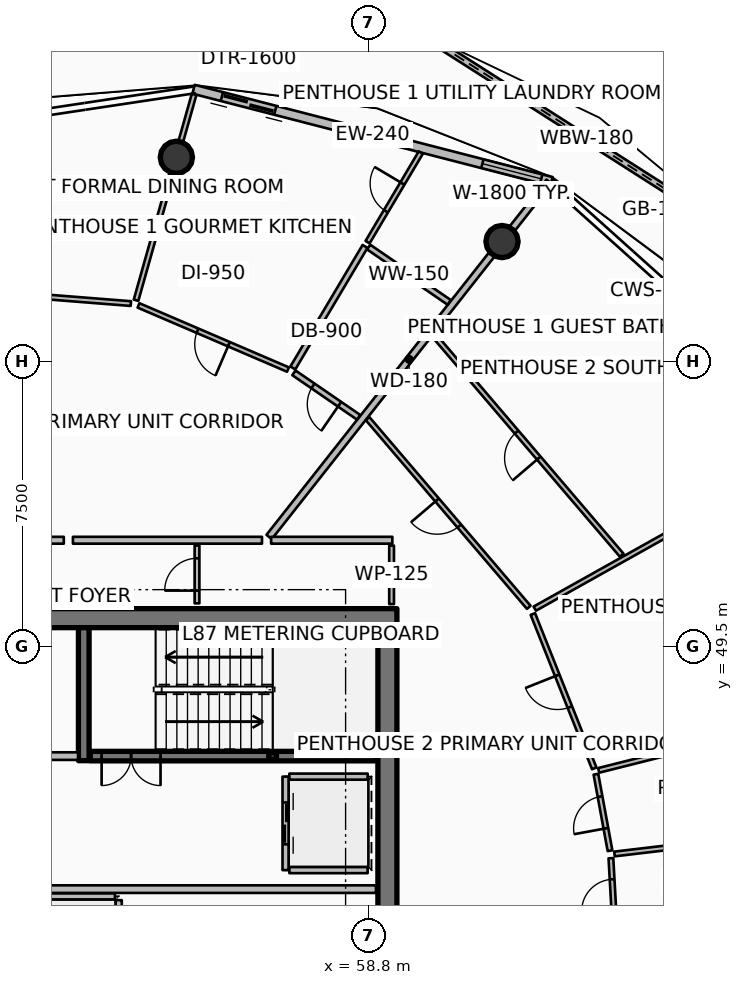
"""IFC4 building model, lengths in metres.
Left out: names, types, materials, properties, quantities, classifications, styles, units other than length and angle.
Written with IfcOpenShell. Run it as: python <this file> out.ifc"""

import sys

from ifc_helpers import new_model, si_unit, direction, frame, frame_2d, origin, origin_2d, place, context, subcontext, project, spatial, polyline, rectangle, hollow_rectangle, circle, outline, extrude, element, fill, save


model = new_model("IFC4")
c1 = context("Model", 3, precision=1e-05, world=origin(), true_north=direction((0.0, 1.0)))
c2 = subcontext(c1, "Body", "Model", "MODEL_VIEW")
j1 = project(units=[si_unit("LENGTHUNIT", "METRE"), si_unit("PLANEANGLEUNIT", "RADIAN")], contexts=[c1])
p1 = place(None, origin())
s1 = spatial("IfcSite", under=j1, at=p1, CompositionType="ELEMENT")
p2 = place(p1, origin())
s2 = spatial("IfcBuilding", under=s1, at=p2, CompositionType="ELEMENT")
p3 = place(p2, frame((0.0, 0.0, 347.3)))
s3 = spatial("IfcBuildingStorey", under=s2, at=p3, CompositionType="ELEMENT", Elevation=347.3)
p4 = place(p3, frame((49.95, 50.25, 0.0), z_axis=(0.0, 0.0, 1.0), x_axis=(1.0, 0.0, 0.0)))
e1 = element("IfcWall", 1, at=p4, inside=s3, PredefinedType="SHEAR", context=c2, shape_type="SweptSolid", body=[
    extrude(rectangle(XDim=9.6, YDim=0.5, at=frame_2d((4.8, 0.0))), origin(), (0.0, 0.0, 1.0), 4.2),
])
p5 = place(p3, frame((59.3, 34.0, 0.0), z_axis=(0.0, 0.0, 1.0), x_axis=(0.0, 1.0, 0.0)))
e2 = element("IfcWall", 2, at=p5, inside=s3, PredefinedType="SHEAR", context=c2, shape_type="SweptSolid", body=[
    extrude(rectangle(XDim=16.0, YDim=0.5, at=frame_2d((8.0, 0.0))), origin(), (0.0, 0.0, 1.0), 4.2),
])
p6 = place(p3, frame((51.31, 46.5, 0.0), z_axis=(0.0, 0.0, 1.0), x_axis=(0.0, 1.0, 0.0)))
e3 = element("IfcWall", 3, at=p6, inside=s3, PredefinedType="SHEAR", context=c2, shape_type="SweptSolid", body=[
    extrude(rectangle(XDim=3.5, YDim=0.28, at=frame_2d((1.75, 0.0))), origin(), (0.0, 0.0, 1.0), 4.2),
])
p7 = place(p3, frame((56.28, 46.62, 0.0), z_axis=(0.0, 0.0, 1.0), x_axis=(1.0, 0.0, 0.0)))
e4 = element("IfcColumn", 4, at=p7, inside=s3, PredefinedType="COLUMN", context=c2, shape_type="SweptSolid", body=[
    extrude(hollow_rectangle(XDim=0.2, YDim=0.2, WallThickness=0.01, InnerFilletRadius=0.01, OuterFilletRadius=0.02, at=origin_2d()), origin(), (0.0, 0.0, 1.0), 1.895),
])
p8 = place(p3, frame((62.316, 60.159, 0.0), z_axis=(-0.160640140705, -0.203700881396, 0.965764306709), x_axis=(0.785213254806, -0.619225439139, 0.0)))
e5 = element("IfcColumn", 5, at=p8, inside=s3, PredefinedType="COLUMN", context=c2, shape_type="SweptSolid", body=[
    extrude(circle(Radius=0.425, at=origin_2d()), origin(), (0.0, 0.0, 1.0), 3.935),
])
p9 = place(p3, frame((53.747, 62.376, 0.0), z_axis=(-0.064758926889, -0.229838041096, 0.971071962448), x_axis=(0.96252315306, -0.271199520325, 0.0)))
e6 = element("IfcColumn", 6, at=p9, inside=s3, PredefinedType="COLUMN", context=c2, shape_type="SweptSolid", body=[
    extrude(circle(Radius=0.425, at=origin_2d()), origin(), (0.0, 0.0, 1.0), 3.913),
])
p10 = place(p3, frame((68.907, 60.078, 0.0), z_axis=(0.0, 0.0, 1.0), x_axis=(-0.842921526724, 0.538036522725, 0.0)))
e7 = element("IfcWall", 7, at=p10, inside=s3, PredefinedType="PARAPET", context=c2, shape_type="SweptSolid", body=[
    extrude(outline(polyline([(0.0, 0.0), (10.35, 0.0), (10.35, 1.632), (5.175, 1.418), (0.0, 1.233), (0.0, 0.0)])), frame((0.0, 0.09, 0.0), z_axis=(0.0, -1.0, 0.0), x_axis=(1.0, 0.0, 0.0)), (0.0, 0.0, 1.0), 0.18),
])
p11 = place(p3, frame((63.62, 61.74, 0.0), z_axis=(0.0, 0.0, 1.0), x_axis=(-0.968389076094, 0.249444577616, 0.0)))
e8 = element("IfcWall", 8, at=p11, inside=s3, PredefinedType="SOLIDWALL", context=c2, shape_type="SweptSolid", body=[
    extrude(rectangle(XDim=9.728, YDim=0.24, at=frame_2d((4.864, 0.0))), origin(), (0.0, 0.0, 1.0), 2.75),
])
p12 = place(p11, frame((7.508, 0.0, 0.0)))
e9 = element("IfcOpeningElement", 9, at=p12, cuts=e8, PredefinedType="OPENING", context=c2, shape_type="SweptSolid", body=[
    extrude(rectangle(XDim=1.45, YDim=2.15, at=frame_2d((0.725, 1.075))), frame((0.0, 0.13, 0.0), z_axis=(0.0, -1.0, 0.0), x_axis=(1.0, 0.0, 0.0)), (0.0, 0.0, 1.0), 0.26),
])
p13 = place(p11, frame((0.28, 0.0, 0.65)))
e10 = element("IfcOpeningElement", 10, at=p13, cuts=e8, PredefinedType="OPENING", context=c2, shape_type="SweptSolid", body=[
    extrude(rectangle(XDim=1.6, YDim=1.5, at=frame_2d((0.8, 0.75))), frame((0.0, 0.13, 0.0), z_axis=(0.0, -1.0, 0.0), x_axis=(1.0, 0.0, 0.0)), (0.0, 0.0, 1.0), 0.26),
])
p14 = place(p3, frame((51.48, 46.62, 0.0), z_axis=(0.0, 0.0, 1.0), x_axis=(1.0, 0.0, 0.0)))
e11 = element("IfcWall", 11, at=p14, inside=s3, PredefinedType="SOLIDWALL", context=c2, shape_type="SweptSolid", body=[
    extrude(rectangle(XDim=7.54, YDim=0.25, at=frame_2d((3.77, 0.0))), origin(), (0.0, 0.0, 1.0), 3.8),
])
p15 = place(p14, frame((0.3, 0.0, 0.0)))
e12 = element("IfcOpeningElement", 12, at=p15, cuts=e11, PredefinedType="OPENING", context=c2, shape_type="SweptSolid", body=[
    extrude(rectangle(XDim=1.55, YDim=2.15, at=frame_2d((0.775, 1.075))), frame((0.0, 0.135, 0.0), z_axis=(0.0, -1.0, 0.0), x_axis=(1.0, 0.0, 0.0)), (0.0, 0.0, 1.0), 0.27),
])
p16 = place(p3, frame((56.62, 46.08, 0.0), z_axis=(0.0, 0.0, 1.0), x_axis=(0.0, -1.0, 0.0)))
e13 = element("IfcWall", 13, at=p16, inside=s3, PredefinedType="PARTITIONING", context=c2, shape_type="SweptSolid", body=[
    extrude(rectangle(XDim=2.46, YDim=0.16, at=frame_2d((1.23, 0.0))), origin(), (0.0, 0.0, 1.0), 3.8),
])
p17 = place(p16, frame((0.68, 0.0, 0.0)))
e14 = element("IfcOpeningElement", 14, at=p17, cuts=e13, PredefinedType="OPENING", context=c2, shape_type="SweptSolid", body=[
    extrude(rectangle(XDim=1.1, YDim=2.1, at=frame_2d((0.55, 1.05))), frame((0.0, 0.09, 0.0), z_axis=(0.0, -1.0, 0.0), x_axis=(1.0, 0.0, 0.0)), (0.0, 0.0, 1.0), 0.18),
])
for number, where, z_axis, x_axis in (
    (15, (56.72, 46.08, 0.0), (0.0, 0.0, 1.0), (1.0, 0.0, 0.0)),
    (16, (56.72, 43.62, 0.0), (0.0, 0.0, 1.0), (1.0, 0.0, 0.0)),
):
    element("IfcWall", number, at=place(p3, frame(where, z_axis=z_axis, x_axis=x_axis)), inside=s3, PredefinedType="PARTITIONING", context=c2, shape_type="SweptSolid", body=[
        extrude(rectangle(XDim=2.06, YDim=0.16, at=frame_2d((1.03, 0.0))), origin(), (0.0, 0.0, 1.0), 3.8),
    ])
p18 = place(p3, frame((52.23, 40.67, 0.0), z_axis=(0.0, 0.0, 1.0), x_axis=(0.0, 1.0, 0.0)))
e17 = element("IfcWall", 17, at=p18, inside=s3, PredefinedType="PARTITIONING", context=c2, shape_type="SweptSolid", body=[
    extrude(rectangle(XDim=2.16, YDim=0.16, at=frame_2d((1.08, 0.0))), origin(), (0.0, 0.0, 1.0), 3.8),
])
p19 = place(p3, frame((50.17, 42.93, 0.0), z_axis=(0.0, 0.0, 1.0), x_axis=(1.0, 0.0, 0.0)))
e18 = element("IfcWall", 18, at=p19, inside=s3, PredefinedType="PARTITIONING", context=c2, shape_type="SweptSolid", body=[
    extrude(rectangle(XDim=1.96, YDim=0.16, at=frame_2d((0.98, 0.0))), origin(), (0.0, 0.0, 1.0), 3.8),
])
p20 = place(p3, frame((50.12, 43.12, 0.0), z_axis=(0.0, 0.0, 1.0), x_axis=(1.0, 0.0, 0.0)))
e19 = element("IfcWall", 19, at=p20, inside=s3, PredefinedType="PARTITIONING", context=c2, shape_type="SweptSolid", body=[
    extrude(rectangle(XDim=8.88, YDim=0.2, at=frame_2d((4.44, 0.0))), origin(), (0.0, 0.0, 1.0), 3.8),
])
p21 = place(p3, frame((50.14, 46.62, 0.0), z_axis=(0.0, 0.0, 1.0), x_axis=(1.0, 0.0, 0.0)))
e20 = element("IfcWall", 20, at=p21, inside=s3, PredefinedType="PARTITIONING", context=c2, shape_type="SweptSolid", body=[
    extrude(rectangle(XDim=1.02, YDim=0.2, at=frame_2d((0.51, 0.0))), origin(), (0.0, 0.0, 1.0), 3.8),
])
p22 = place(p3, frame((59.41, 50.62, 0.0), z_axis=(0.0, 0.0, 1.0), x_axis=(0.0, 1.0, 0.0)))
e21 = element("IfcWall", 21, at=p22, inside=s3, PredefinedType="PARTITIONING", context=c2, shape_type="SweptSolid", body=[
    extrude(rectangle(XDim=1.54, YDim=0.125, at=frame_2d((0.77, 0.0))), origin(), (0.0, 0.0, 1.0), 3.24),
])
p23 = place(p3, frame((54.29, 50.64, 0.0), z_axis=(0.0, 0.0, 1.0), x_axis=(0.0, 1.0, 0.0)))
e22 = element("IfcWall", 22, at=p23, inside=s3, PredefinedType="PARTITIONING", context=c2, shape_type="SweptSolid", body=[
    extrude(rectangle(XDim=1.52, YDim=0.125, at=frame_2d((0.76, 0.0))), origin(), (0.0, 0.0, 1.0), 3.24),
])
p24 = place(p23, frame((0.335, 0.0, 0.0)))
e23 = element("IfcOpeningElement", 23, at=p24, cuts=e22, PredefinedType="OPENING", context=c2, shape_type="SweptSolid", body=[
    extrude(rectangle(XDim=0.85, YDim=2.06, at=frame_2d((0.425, 1.03))), frame((0.0, 0.073, 0.0), z_axis=(0.0, -1.0, 0.0), x_axis=(1.0, 0.0, 0.0)), (0.0, 0.0, 1.0), 0.145),
])
p25 = place(p3, frame((56.188, 52.386, 0.0), z_axis=(0.0, 0.0, 1.0), x_axis=(0.619092742501, 0.78531788225, 0.0)))
e24 = element("IfcWall", 24, at=p25, inside=s3, PredefinedType="PARTITIONING", context=c2, shape_type="SweptSolid", body=[
    extrude(rectangle(XDim=11.901, YDim=0.18, at=frame_2d((5.951, 0.0))), origin(), (0.0, 0.0, 1.0), 2.757),
])
p26 = place(p3, frame((56.0, 52.3, 0.0), z_axis=(0.0, 0.0, 1.0), x_axis=(-1.0, 0.0, 0.0)))
e25 = element("IfcWall", 25, at=p26, inside=s3, PredefinedType="PARTITIONING", context=c2, shape_type="SweptSolid", body=[
    extrude(rectangle(XDim=4.975, YDim=0.18, at=frame_2d((2.488, 0.0))), origin(), (0.0, 0.0, 1.0), 2.757),
])
p27 = place(p3, frame((58.543, 55.535, 0.0), z_axis=(0.0, 0.0, 1.0), x_axis=(-0.824355515216, 0.566072419865, 0.0)))
e26 = element("IfcWall", 26, at=p27, inside=s3, PredefinedType="PARTITIONING", context=c2, shape_type="SweptSolid", body=[
    extrude(rectangle(XDim=2.066, YDim=0.15, at=frame_2d((1.033, 0.0))), origin(), (0.0, 0.0, 1.0), 2.757),
])
p28 = place(p27, frame((0.608, 0.0, 0.0)))
e27 = element("IfcOpeningElement", 27, at=p28, cuts=e26, PredefinedType="OPENING", context=c2, shape_type="SweptSolid", body=[
    extrude(rectangle(XDim=0.85, YDim=2.06, at=frame_2d((0.425, 1.03))), frame((0.0, 0.085, 0.0), z_axis=(0.0, -1.0, 0.0), x_axis=(1.0, 0.0, 0.0)), (0.0, 0.0, 1.0), 0.17),
])
p29 = place(p3, frame((60.927, 58.559, 0.0), z_axis=(0.0, 0.0, 1.0), x_axis=(-0.824349211277, 0.566081600007, 0.0)))
e28 = element("IfcWall", 28, at=p29, inside=s3, PredefinedType="PARTITIONING", context=c2, shape_type="SweptSolid", body=[
    extrude(rectangle(XDim=2.572, YDim=0.15, at=frame_2d((1.286, 0.0))), origin(), (0.0, 0.0, 1.0), 2.757),
])
p30 = place(p3, frame((56.812, 56.833, 0.0), z_axis=(0.0, 0.0, 1.0), x_axis=(0.510726768545, 0.859743082491, 0.0)))
e29 = element("IfcWall", 29, at=p30, inside=s3, PredefinedType="PARTITIONING", context=c2, shape_type="SweptSolid", body=[
    extrude(rectangle(XDim=3.72, YDim=0.15, at=frame_2d((1.86, 0.0))), origin(), (0.0, 0.0, 1.0), 2.775),
])
p31 = place(p3, frame((58.778, 60.143, 0.0), z_axis=(0.0, 0.0, 1.0), x_axis=(0.510643596404, 0.85979248511, 0.0)))
e30 = element("IfcWall", 30, at=p31, inside=s3, PredefinedType="PARTITIONING", context=c2, shape_type="SweptSolid", body=[
    extrude(rectangle(XDim=2.744, YDim=0.125, at=frame_2d((1.372, 0.0))), origin(), (0.0, 0.0, 1.0), 2.775),
])
p32 = place(p31, frame((0.947, 0.0, 0.0)))
e31 = element("IfcOpeningElement", 31, at=p32, cuts=e30, PredefinedType="OPENING", context=c2, shape_type="SweptSolid", body=[
    extrude(rectangle(XDim=0.85, YDim=2.06, at=frame_2d((0.425, 1.03))), frame((0.0, 0.073, 0.0), z_axis=(0.0, -1.0, 0.0), x_axis=(1.0, 0.0, 0.0)), (0.0, 0.0, 1.0), 0.145),
])
p33 = place(p3, frame((56.683, 56.791, 0.0), z_axis=(0.0, 0.0, 1.0), x_axis=(-0.918926533299, 0.394428734246, 0.0)))
e32 = element("IfcWall", 32, at=p33, inside=s3, PredefinedType="PARTITIONING", context=c2, shape_type="SweptSolid", body=[
    extrude(rectangle(XDim=4.28, YDim=0.125, at=frame_2d((2.14, 0.0))), origin(), (0.0, 0.0, 1.0), 2.757),
])
p34 = place(p33, frame((1.69, 0.0, 0.0)))
e33 = element("IfcOpeningElement", 33, at=p34, cuts=e32, PredefinedType="OPENING", context=c2, shape_type="SweptSolid", body=[
    extrude(rectangle(XDim=0.9, YDim=2.08, at=frame_2d((0.45, 1.04))), frame((0.0, 0.073, 0.0), z_axis=(0.0, -1.0, 0.0), x_axis=(1.0, 0.0, 0.0)), (0.0, 0.0, 1.0), 0.145),
])
p35 = place(p3, frame((50.785, 52.3, 0.0), z_axis=(0.0, 0.0, 1.0), x_axis=(-1.0, 0.0, 0.0)))
e34 = element("IfcWall", 34, at=p35, inside=s3, PredefinedType="PARTITIONING", context=c2, shape_type="SweptSolid", body=[
    extrude(rectangle(XDim=3.884, YDim=0.18, at=frame_2d((1.942, 0.0))), origin(), (0.0, 0.0, 1.0), 2.757),
])
p36 = place(p3, frame((52.686, 58.615, 0.0), z_axis=(0.0, 0.0, 1.0), x_axis=(0.271455015282, 0.962451128462, 0.0)))
e35 = element("IfcWall", 35, at=p36, inside=s3, PredefinedType="PARTITIONING", context=c2, shape_type="SweptSolid", body=[
    extrude(rectangle(XDim=5.63, YDim=0.125, at=frame_2d((2.815, 0.0))), origin(), (0.0, 0.0, 1.0), 2.757),
])
p37 = place(p3, frame((52.549, 58.527, 0.0), z_axis=(0.0, 0.0, 1.0), x_axis=(-0.996915635348, 0.078480672772, 0.0)))
e36 = element("IfcWall", 36, at=p37, inside=s3, PredefinedType="PARTITIONING", context=c2, shape_type="SweptSolid", body=[
    extrude(rectangle(XDim=6.477, YDim=0.125, at=frame_2d((3.238, 0.0))), origin(), (0.0, 0.0, 1.0), 2.757),
])
p38 = place(p37, frame((2.788, 0.0, 0.0)))
e37 = element("IfcOpeningElement", 37, at=p38, cuts=e36, PredefinedType="OPENING", context=c2, shape_type="SweptSolid", body=[
    extrude(rectangle(XDim=0.9, YDim=2.08, at=frame_2d((0.45, 1.04))), frame((0.0, 0.073, 0.0), z_axis=(0.0, -1.0, 0.0), x_axis=(1.0, 0.0, 0.0)), (0.0, 0.0, 1.0), 0.145),
])
p39 = place(p3, frame((65.291, 41.976, 0.0), z_axis=(0.0, 0.0, 1.0), x_axis=(-0.055932266986, 0.998434565462, 0.0)))
e38 = element("IfcWall", 38, at=p39, inside=s3, PredefinedType="PARTITIONING", context=c2, shape_type="SweptSolid", body=[
    extrude(rectangle(XDim=1.96, YDim=0.125, at=frame_2d((0.98, 0.0))), origin(), (0.0, 0.0, 1.0), 2.757),
])
p40 = place(p39, frame((0.555, 0.0, 0.0)))
e39 = element("IfcOpeningElement", 39, at=p40, cuts=e38, PredefinedType="OPENING", context=c2, shape_type="SweptSolid", body=[
    extrude(rectangle(XDim=0.85, YDim=2.06, at=frame_2d((0.425, 1.03))), frame((0.0, 0.073, 0.0), z_axis=(0.0, -1.0, 0.0), x_axis=(1.0, 0.0, 0.0)), (0.0, 0.0, 1.0), 0.145),
])
p41 = place(p3, frame((65.275, 44.045, 0.0), z_axis=(0.0, 0.0, 1.0), x_axis=(0.993069210767, 0.117531028353, 0.0)))
e40 = element("IfcWall", 40, at=p41, inside=s3, PredefinedType="PARTITIONING", context=c2, shape_type="SweptSolid", body=[
    extrude(rectangle(XDim=8.44, YDim=0.125, at=frame_2d((4.22, 0.0))), origin(), (0.0, 0.0, 1.0), 2.757),
])
p42 = place(p3, frame((64.86, 46.244, 0.0), z_axis=(0.0, 0.0, 1.0), x_axis=(0.969745005786, 0.244120101083, 0.0)))
e41 = element("IfcWall", 41, at=p42, inside=s3, PredefinedType="PARTITIONING", context=c2, shape_type="SweptSolid", body=[
    extrude(rectangle(XDim=8.011, YDim=0.125, at=frame_2d((4.005, 0.0))), origin(), (0.0, 0.0, 1.0), 2.775),
])
p43 = place(p3, frame((65.158, 44.131, 0.0), z_axis=(0.0, 0.0, 1.0), x_axis=(-0.181226197609, 0.98344143969, 0.0)))
e42 = element("IfcWall", 42, at=p43, inside=s3, PredefinedType="PARTITIONING", context=c2, shape_type="SweptSolid", body=[
    extrude(rectangle(XDim=2.046, YDim=0.125, at=frame_2d((1.023, 0.0))), origin(), (0.0, 0.0, 1.0), 2.757),
])
p44 = place(p43, frame((0.598, 0.0, 0.0)))
e43 = element("IfcOpeningElement", 43, at=p44, cuts=e42, PredefinedType="OPENING", context=c2, shape_type="SweptSolid", body=[
    extrude(rectangle(XDim=0.85, YDim=2.06, at=frame_2d((0.425, 1.03))), frame((0.0, 0.073, 0.0), z_axis=(0.0, -1.0, 0.0), x_axis=(1.0, 0.0, 0.0)), (0.0, 0.0, 1.0), 0.145),
])
p45 = place(p3, frame((64.743, 46.297, 0.0), z_axis=(0.0, 0.0, 1.0), x_axis=(-0.369569971378, 0.929202903706, 0.0)))
e44 = element("IfcWall", 44, at=p45, inside=s3, PredefinedType="PARTITIONING", context=c2, shape_type="SweptSolid", body=[
    extrude(rectangle(XDim=4.371, YDim=0.125, at=frame_2d((2.186, 0.0))), origin(), (0.0, 0.0, 1.0), 2.757),
])
p46 = place(p45, frame((1.736, 0.0, 0.0)))
e45 = element("IfcOpeningElement", 45, at=p46, cuts=e44, PredefinedType="OPENING", context=c2, shape_type="SweptSolid", body=[
    extrude(rectangle(XDim=0.9, YDim=2.08, at=frame_2d((0.45, 1.04))), frame((0.0, 0.073, 0.0), z_axis=(0.0, -1.0, 0.0), x_axis=(1.0, 0.0, 0.0)), (0.0, 0.0, 1.0), 0.145),
])
p47 = place(p3, frame((59.43, 52.3, 0.0), z_axis=(0.0, 0.0, 1.0), x_axis=(-1.0, 0.0, 0.0)))
e46 = element("IfcWall", 46, at=p47, inside=s3, PredefinedType="PARTITIONING", context=c2, shape_type="SweptSolid", body=[
    extrude(rectangle(XDim=3.19, YDim=0.18, at=frame_2d((1.595, 0.0))), origin(), (0.0, 0.0, 1.0), 2.757),
])
p48 = place(p3, frame((63.178, 50.5, 0.0), z_axis=(0.0, 0.0, 1.0), x_axis=(0.872495656661, 0.488621867201, 0.0)))
e47 = element("IfcWall", 47, at=p48, inside=s3, PredefinedType="PARTITIONING", context=c2, shape_type="SweptSolid", body=[
    extrude(rectangle(XDim=8.44, YDim=0.125, at=frame_2d((4.22, 0.0))), origin(), (0.0, 0.0, 1.0), 2.757),
])
p49 = place(p3, frame((63.019, 50.535, 0.0), z_axis=(0.0, 0.0, 1.0), x_axis=(-0.649450715324, 0.760403687764, 0.0)))
e48 = element("IfcWall", 48, at=p49, inside=s3, PredefinedType="PARTITIONING", context=c2, shape_type="SweptSolid", body=[
    extrude(rectangle(XDim=6.529, YDim=0.125, at=frame_2d((3.264, 0.0))), origin(), (0.0, 0.0, 1.0), 2.757),
])
p50 = place(p49, frame((2.814, 0.0, 0.0)))
e49 = element("IfcOpeningElement", 49, at=p50, cuts=e48, PredefinedType="OPENING", context=c2, shape_type="SweptSolid", body=[
    extrude(rectangle(XDim=0.9, YDim=2.08, at=frame_2d((0.45, 1.04))), frame((0.0, 0.073, 0.0), z_axis=(0.0, -1.0, 0.0), x_axis=(1.0, 0.0, 0.0)), (0.0, 0.0, 1.0), 0.145),
])
p51 = place(p3, frame((65.467, 51.906, 0.0), z_axis=(0.0, 0.0, 1.0), x_axis=(-0.649439942486, 0.760412888571, 0.0)))
e50 = element("IfcWall", 50, at=p51, inside=s3, PredefinedType="PARTITIONING", context=c2, shape_type="SweptSolid", body=[
    extrude(rectangle(XDim=7.623, YDim=0.125, at=frame_2d((3.812, 0.0))), origin(), (0.0, 0.0, 1.0), 2.757),
])
p52 = place(p51, frame((3.362, 0.0, 0.0)))
e51 = element("IfcOpeningElement", 51, at=p52, cuts=e50, PredefinedType="OPENING", context=c2, shape_type="SweptSolid", body=[
    extrude(rectangle(XDim=0.9, YDim=2.08, at=frame_2d((0.45, 1.04))), frame((0.0, 0.073, 0.0), z_axis=(0.0, -1.0, 0.0), x_axis=(1.0, 0.0, 0.0)), (0.0, 0.0, 1.0), 0.145),
])
p53 = place(p12, origin())
e52 = element("IfcDoor", 52, at=p53, inside=s3, OperationType="DOUBLE_DOOR_SLIDING", PredefinedType="DOOR", context=c2, shape_type="SweptSolid", body=[
    extrude(rectangle(XDim=1.45, YDim=2.15, at=frame_2d((0.725, 1.075))), frame((0.0, 0.025, 0.0), z_axis=(0.0, -1.0, 0.0), x_axis=(1.0, 0.0, 0.0)), (0.0, 0.0, 1.0), 0.05),
])
fill(e9, e52)
p54 = place(p13, origin())
e53 = element("IfcWindow", 53, at=p54, inside=s3, PartitioningType="SINGLE_PANEL", PredefinedType="WINDOW", context=c2, shape_type="SweptSolid", body=[
    extrude(rectangle(XDim=1.6, YDim=1.5, at=frame_2d((0.8, 0.75))), frame((0.0, 0.03, 0.0), z_axis=(0.0, -1.0, 0.0), x_axis=(1.0, 0.0, 0.0)), (0.0, 0.0, 1.0), 0.06),
])
fill(e10, e53)
p55 = place(p15, origin())
e54 = element("IfcDoor", 54, at=p55, inside=s3, OperationType="DOUBLE_DOOR_SINGLE_SWING", PredefinedType="DOOR", context=c2, shape_type="SweptSolid", body=[
    extrude(rectangle(XDim=1.55, YDim=2.15, at=frame_2d((0.775, 1.075))), frame((0.0, 0.025, 0.0), z_axis=(0.0, -1.0, 0.0), x_axis=(1.0, 0.0, 0.0)), (0.0, 0.0, 1.0), 0.05),
])
fill(e12, e54)
p56 = place(p17, origin())
e55 = element("IfcDoor", 55, at=p56, inside=s3, OperationType="DOUBLE_DOOR_SLIDING", PredefinedType="DOOR", context=c2, shape_type="SweptSolid", body=[
    extrude(rectangle(XDim=1.1, YDim=2.1, at=frame_2d((0.55, 1.05))), frame((0.0, 0.025, 0.0), z_axis=(0.0, -1.0, 0.0), x_axis=(1.0, 0.0, 0.0)), (0.0, 0.0, 1.0), 0.05),
])
fill(e14, e55)
p57 = place(p24, origin())
e56 = element("IfcDoor", 56, at=p57, inside=s3, OperationType="SINGLE_SWING_LEFT", PredefinedType="DOOR", context=c2, shape_type="SweptSolid", body=[
    extrude(rectangle(XDim=0.85, YDim=2.06, at=frame_2d((0.425, 1.03))), frame((0.0, 0.025, 0.0), z_axis=(0.0, -1.0, 0.0), x_axis=(1.0, 0.0, 0.0)), (0.0, 0.0, 1.0), 0.05),
])
fill(e23, e56)
p58 = place(p28, origin())
e57 = element("IfcDoor", 57, at=p58, inside=s3, OperationType="SINGLE_SWING_LEFT", PredefinedType="DOOR", context=c2, shape_type="SweptSolid", body=[
    extrude(rectangle(XDim=0.85, YDim=2.06, at=frame_2d((0.425, 1.03))), frame((0.0, 0.025, 0.0), z_axis=(0.0, -1.0, 0.0), x_axis=(1.0, 0.0, 0.0)), (0.0, 0.0, 1.0), 0.05),
])
fill(e27, e57)
p59 = place(p32, origin())
e58 = element("IfcDoor", 58, at=p59, inside=s3, OperationType="SINGLE_SWING_RIGHT", PredefinedType="DOOR", context=c2, shape_type="SweptSolid", body=[
    extrude(rectangle(XDim=0.85, YDim=2.06, at=frame_2d((0.425, 1.03))), frame((0.0, 0.025, 0.0), z_axis=(0.0, -1.0, 0.0), x_axis=(1.0, 0.0, 0.0)), (0.0, 0.0, 1.0), 0.05),
])
fill(e31, e58)
p60 = place(p34, origin())
e59 = element("IfcDoor", 59, at=p60, inside=s3, OperationType="SINGLE_SWING_LEFT", PredefinedType="DOOR", context=c2, shape_type="SweptSolid", body=[
    extrude(rectangle(XDim=0.9, YDim=2.08, at=frame_2d((0.45, 1.04))), frame((0.0, 0.025, 0.0), z_axis=(0.0, -1.0, 0.0), x_axis=(1.0, 0.0, 0.0)), (0.0, 0.0, 1.0), 0.05),
])
fill(e33, e59)
p61 = place(p40, origin())
e60 = element("IfcDoor", 60, at=p61, inside=s3, OperationType="SINGLE_SWING_LEFT", PredefinedType="DOOR", context=c2, shape_type="SweptSolid", body=[
    extrude(rectangle(XDim=0.85, YDim=2.06, at=frame_2d((0.425, 1.03))), frame((0.0, 0.025, 0.0), z_axis=(0.0, -1.0, 0.0), x_axis=(1.0, 0.0, 0.0)), (0.0, 0.0, 1.0), 0.05),
])
fill(e39, e60)
p62 = place(p44, origin())
e61 = element("IfcDoor", 61, at=p62, inside=s3, OperationType="SINGLE_SWING_LEFT", PredefinedType="DOOR", context=c2, shape_type="SweptSolid", body=[
    extrude(rectangle(XDim=0.85, YDim=2.06, at=frame_2d((0.425, 1.03))), frame((0.0, 0.025, 0.0), z_axis=(0.0, -1.0, 0.0), x_axis=(1.0, 0.0, 0.0)), (0.0, 0.0, 1.0), 0.05),
])
fill(e43, e61)
p63 = place(p46, origin())
e62 = element("IfcDoor", 62, at=p63, inside=s3, OperationType="SINGLE_SWING_RIGHT", PredefinedType="DOOR", context=c2, shape_type="SweptSolid", body=[
    extrude(rectangle(XDim=0.9, YDim=2.08, at=frame_2d((0.45, 1.04))), frame((0.0, 0.025, 0.0), z_axis=(0.0, -1.0, 0.0), x_axis=(1.0, 0.0, 0.0)), (0.0, 0.0, 1.0), 0.05),
])
fill(e45, e62)
p64 = place(p50, origin())
e63 = element("IfcDoor", 63, at=p64, inside=s3, OperationType="SINGLE_SWING_RIGHT", PredefinedType="DOOR", context=c2, shape_type="SweptSolid", body=[
    extrude(rectangle(XDim=0.9, YDim=2.08, at=frame_2d((0.45, 1.04))), frame((0.0, 0.025, 0.0), z_axis=(0.0, -1.0, 0.0), x_axis=(1.0, 0.0, 0.0)), (0.0, 0.0, 1.0), 0.05),
])
fill(e49, e63)
p65 = place(p52, origin())
e64 = element("IfcDoor", 64, at=p65, inside=s3, OperationType="SINGLE_SWING_LEFT", PredefinedType="DOOR", context=c2, shape_type="SweptSolid", body=[
    extrude(rectangle(XDim=0.9, YDim=2.08, at=frame_2d((0.45, 1.04))), frame((0.0, 0.025, 0.0), z_axis=(0.0, -1.0, 0.0), x_axis=(1.0, 0.0, 0.0)), (0.0, 0.0, 1.0), 0.05),
])
fill(e51, e64)
save(model, sys.argv[1])
